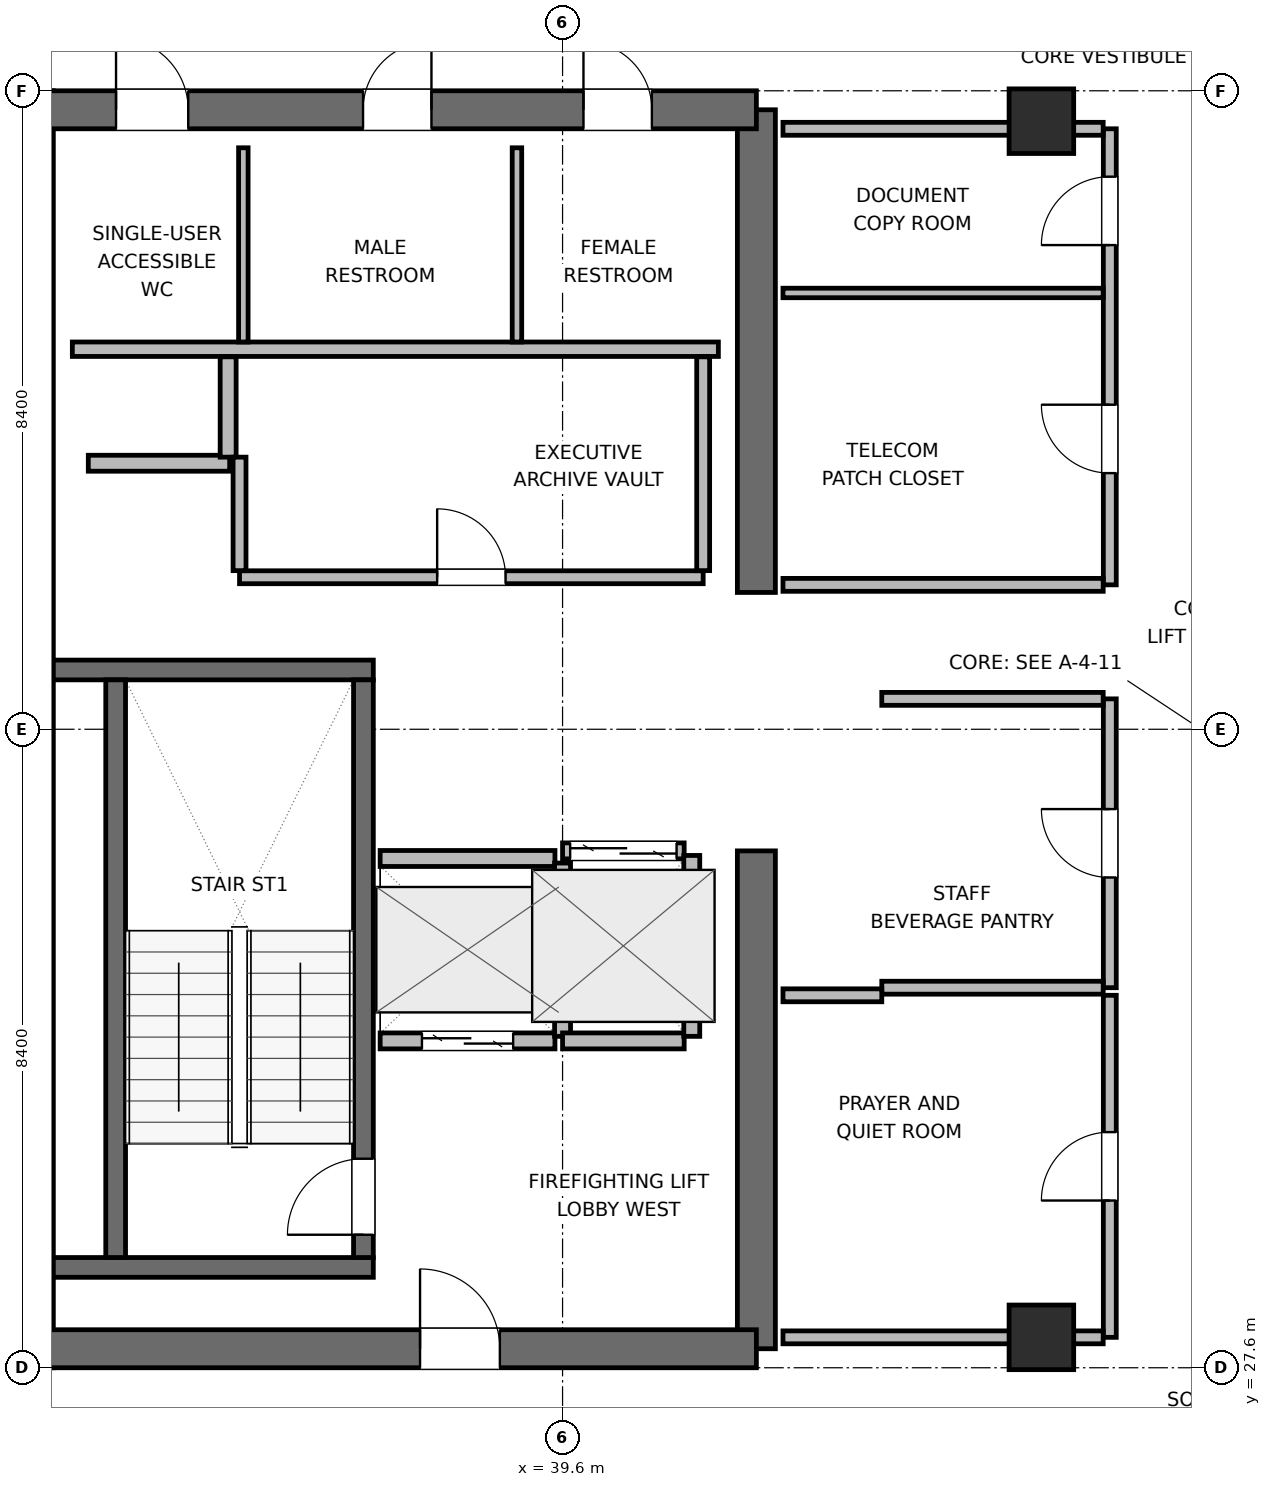
"""IFC4 building model, lengths in metres.
Left out: names, types, materials, properties, quantities, classifications, styles, units other than length and angle.
Written with IfcOpenShell. Run it as: python <this file> out.ifc"""

import sys

from ifc_helpers import new_model, si_unit, direction, frame, frame_2d, origin, origin_2d, place, context, subcontext, project, spatial, rectangle, extrude, element, fill, save


model = new_model("IFC4")
c1 = context("Model", 3, precision=1e-05, world=origin(), true_north=direction((0.0, 1.0)))
c2 = subcontext(c1, "Body", "Model", "MODEL_VIEW")
j1 = project(units=[si_unit("LENGTHUNIT", "METRE"), si_unit("PLANEANGLEUNIT", "RADIAN")], contexts=[c1])
p1 = place(None, origin())
s1 = spatial("IfcSite", under=j1, at=p1, CompositionType="ELEMENT")
p2 = place(p1, origin())
s2 = spatial("IfcBuilding", under=s1, at=p2, CompositionType="ELEMENT")
p3 = place(p2, frame((0.0, 0.0, 262.8)))
s3 = spatial("IfcBuildingStorey", under=s2, at=p3, CompositionType="ELEMENT", Elevation=262.8)
p4 = place(p3, frame((32.65, 27.6, 0.0), z_axis=(0.0, 0.0, 1.0), x_axis=(0.0, 1.0, 0.0)))
e1 = element("IfcWall", 1, at=p4, inside=s3, PredefinedType="SHEAR", context=c2, shape_type="SweptSolid", body=[
    extrude(rectangle(XDim=16.8, YDim=0.5, at=frame_2d((8.4, 0.0))), origin(), (0.0, 0.0, 1.0), 3.9),
])
p5 = place(p3, frame((42.15, 27.85, 0.0), z_axis=(0.0, 0.0, 1.0), x_axis=(0.0, 1.0, 0.0)))
e2 = element("IfcWall", 2, at=p5, inside=s3, PredefinedType="SHEAR", context=c2, shape_type="SweptSolid", body=[
    extrude(rectangle(XDim=6.55, YDim=0.5, at=frame_2d((3.275, 0.0))), origin(), (0.0, 0.0, 1.0), 3.9),
])
p6 = place(p3, frame((42.15, 37.8, 0.0), z_axis=(0.0, 0.0, 1.0), x_axis=(0.0, 1.0, 0.0)))
e3 = element("IfcWall", 3, at=p6, inside=s3, PredefinedType="SHEAR", context=c2, shape_type="SweptSolid", body=[
    extrude(rectangle(XDim=6.35, YDim=0.5, at=frame_2d((3.175, 0.0))), origin(), (0.0, 0.0, 1.0), 3.9),
])
p7 = place(p3, frame((32.65, 27.85, 0.0), z_axis=(0.0, 0.0, 1.0), x_axis=(1.0, 0.0, 0.0)))
e4 = element("IfcWall", 4, at=p7, inside=s3, PredefinedType="SHEAR", context=c2, shape_type="SweptSolid", body=[
    extrude(rectangle(XDim=9.5, YDim=0.5, at=frame_2d((4.75, 0.0))), origin(), (0.0, 0.0, 1.0), 3.9),
])
p8 = place(p7, frame((5.075, 0.0, 0.0)))
e5 = element("IfcOpeningElement", 5, at=p8, cuts=e4, PredefinedType="OPENING", context=c2, shape_type="SweptSolid", body=[
    extrude(rectangle(XDim=1.05, YDim=2.04, at=frame_2d((0.525, 1.02))), frame((0.0, 0.26, 0.0), z_axis=(0.0, -1.0, 0.0), x_axis=(1.0, 0.0, 0.0)), (0.0, 0.0, 1.0), 0.52),
])
p9 = place(p3, frame((32.65, 44.15, 0.0), z_axis=(0.0, 0.0, 1.0), x_axis=(1.0, 0.0, 0.0)))
e6 = element("IfcWall", 6, at=p9, inside=s3, PredefinedType="SHEAR", context=c2, shape_type="SweptSolid", body=[
    extrude(rectangle(XDim=9.5, YDim=0.5, at=frame_2d((4.75, 0.0))), origin(), (0.0, 0.0, 1.0), 3.9),
])
p10 = place(p9, frame((1.075, 0.0, 0.0)))
e7 = element("IfcOpeningElement", 7, at=p10, cuts=e6, PredefinedType="OPENING", context=c2, shape_type="SweptSolid", body=[
    extrude(rectangle(XDim=0.95, YDim=2.04, at=frame_2d((0.475, 1.02))), frame((0.0, 0.26, 0.0), z_axis=(0.0, -1.0, 0.0), x_axis=(1.0, 0.0, 0.0)), (0.0, 0.0, 1.0), 0.52),
])
p11 = place(p9, frame((4.325, 0.0, 0.0)))
e8 = element("IfcOpeningElement", 8, at=p11, cuts=e6, PredefinedType="OPENING", context=c2, shape_type="SweptSolid", body=[
    extrude(rectangle(XDim=0.9, YDim=2.02, at=frame_2d((0.45, 1.01))), frame((0.0, 0.26, 0.0), z_axis=(0.0, -1.0, 0.0), x_axis=(1.0, 0.0, 0.0)), (0.0, 0.0, 1.0), 0.52),
])
p12 = place(p9, frame((7.225, 0.0, 0.0)))
e9 = element("IfcOpeningElement", 9, at=p12, cuts=e6, PredefinedType="OPENING", context=c2, shape_type="SweptSolid", body=[
    extrude(rectangle(XDim=0.9, YDim=2.02, at=frame_2d((0.45, 1.01))), frame((0.0, 0.26, 0.0), z_axis=(0.0, -1.0, 0.0), x_axis=(1.0, 0.0, 0.0)), (0.0, 0.0, 1.0), 0.52),
])
for number, where, z_axis, x_axis in (
    (10, (32.9, 28.92, 0.0), (0.0, 0.0, 1.0), (1.0, 0.0, 0.0)),
    (11, (32.9, 36.78, 0.0), (0.0, 0.0, 1.0), (1.0, 0.0, 0.0)),
):
    element("IfcWall", number, at=place(p3, frame(where, z_axis=z_axis, x_axis=x_axis)), inside=s3, PredefinedType="SHEAR", context=c2, shape_type="SweptSolid", body=[
        extrude(rectangle(XDim=4.21, YDim=0.26, at=frame_2d((2.105, 0.0))), origin(), (0.0, 0.0, 1.0), 3.9),
    ])
p13 = place(p3, frame((33.72, 29.05, 0.0), z_axis=(0.0, 0.0, 1.0), x_axis=(0.0, 1.0, 0.0)))
e12 = element("IfcWall", 12, at=p13, inside=s3, PredefinedType="SHEAR", context=c2, shape_type="SweptSolid", body=[
    extrude(rectangle(XDim=7.6, YDim=0.26, at=frame_2d((3.8, 0.0))), origin(), (0.0, 0.0, 1.0), 3.9),
])
p14 = place(p3, frame((36.98, 29.05, 0.0), z_axis=(0.0, 0.0, 1.0), x_axis=(0.0, 1.0, 0.0)))
e13 = element("IfcWall", 13, at=p14, inside=s3, PredefinedType="SHEAR", context=c2, shape_type="SweptSolid", body=[
    extrude(rectangle(XDim=7.6, YDim=0.26, at=frame_2d((3.8, 0.0))), origin(), (0.0, 0.0, 1.0), 3.9),
])
p15 = place(p14, frame((0.3, 0.0, 0.0)))
e14 = element("IfcOpeningElement", 14, at=p15, cuts=e13, PredefinedType="OPENING", context=c2, shape_type="SweptSolid", body=[
    extrude(rectangle(XDim=1.0, YDim=2.04, at=frame_2d((0.5, 1.02))), frame((0.0, 0.14, 0.0), z_axis=(0.0, -1.0, 0.0), x_axis=(1.0, 0.0, 0.0)), (0.0, 0.0, 1.0), 0.28),
])
for number, where, z_axis, x_axis in (
    (15, (45.9, 28.0, 0.0), (0.0, 0.0, 1.0), (1.0, 0.0, 0.0)),
    (16, (45.9, 44.0, 0.0), (0.0, 0.0, 1.0), (1.0, 0.0, 0.0)),
):
    element("IfcColumn", number, at=place(p3, frame(where, z_axis=z_axis, x_axis=x_axis)), inside=s3, PredefinedType="COLUMN", context=c2, shape_type="SweptSolid", body=[
        extrude(rectangle(XDim=0.85, YDim=0.85, at=origin_2d()), origin(), (0.0, 0.0, 1.0), 3.9),
    ])
p16 = place(p3, frame((33.15, 41.0, 0.0), z_axis=(0.0, 0.0, 1.0), x_axis=(1.0, 0.0, 0.0)))
e17 = element("IfcWall", 17, at=p16, inside=s3, PredefinedType="PLUMBINGWALL", context=c2, shape_type="SweptSolid", body=[
    extrude(rectangle(XDim=8.5, YDim=0.19, at=frame_2d((4.25, 0.0))), origin(), (0.0, 0.0, 1.0), 3.68),
])
for number, where, z_axis, x_axis in (
    (18, (35.4, 41.095, 0.0), (0.0, 0.0, 1.0), (0.0, 1.0, 0.0)),
    (19, (39.0, 41.095, 0.0), (0.0, 0.0, 1.0), (0.0, 1.0, 0.0)),
):
    element("IfcWall", number, at=place(p3, frame(where, z_axis=z_axis, x_axis=x_axis)), inside=s3, PredefinedType="PARTITIONING", context=c2, shape_type="SweptSolid", body=[
        extrude(rectangle(XDim=2.555, YDim=0.125, at=frame_2d((1.277, 0.0))), origin(), (0.0, 0.0, 1.0), 3.68),
    ])
p17 = place(p3, frame((33.36, 39.5, 0.0), z_axis=(0.0, 0.0, 1.0), x_axis=(1.0, 0.0, 0.0)))
e20 = element("IfcWall", 20, at=p17, inside=s3, PredefinedType="PARTITIONING", context=c2, shape_type="SweptSolid", body=[
    extrude(rectangle(XDim=1.86, YDim=0.21, at=frame_2d((0.93, 0.0))), origin(), (0.0, 0.0, 1.0), 3.68),
])
p18 = place(p3, frame((35.2, 39.58, 0.0), z_axis=(0.0, 0.0, 1.0), x_axis=(0.0, 1.0, 0.0)))
e21 = element("IfcWall", 21, at=p18, inside=s3, PredefinedType="PARTITIONING", context=c2, shape_type="SweptSolid", body=[
    extrude(rectangle(XDim=1.32, YDim=0.21, at=frame_2d((0.66, 0.0))), origin(), (0.0, 0.0, 1.0), 3.68),
])
p19 = place(p3, frame((37.2, 31.9, 0.0), z_axis=(0.0, 0.0, 1.0), x_axis=(1.0, 0.0, 0.0)))
e22 = element("IfcWall", 22, at=p19, inside=s3, PredefinedType="PARTITIONING", context=c2, shape_type="SweptSolid", body=[
    extrude(rectangle(XDim=2.3, YDim=0.21, at=frame_2d((1.15, 0.0))), origin(), (0.0, 0.0, 1.0), 3.68),
])
p20 = place(p19, frame((0.55, 0.0, 0.0)))
e23 = element("IfcOpeningElement", 23, at=p20, cuts=e22, PredefinedType="OPENING", context=c2, shape_type="SweptSolid", body=[
    extrude(rectangle(XDim=1.2, YDim=2.04, at=frame_2d((0.6, 1.02))), frame((0.0, 0.115, 0.0), z_axis=(0.0, -1.0, 0.0), x_axis=(1.0, 0.0, 0.0)), (0.0, 0.0, 1.0), 0.23),
])
p21 = place(p3, frame((37.2, 34.3, 0.0), z_axis=(0.0, 0.0, 1.0), x_axis=(1.0, 0.0, 0.0)))
e24 = element("IfcWall", 24, at=p21, inside=s3, PredefinedType="PARTITIONING", context=c2, shape_type="SweptSolid", body=[
    extrude(rectangle(XDim=2.3, YDim=0.21, at=frame_2d((1.15, 0.0))), origin(), (0.0, 0.0, 1.0), 3.68),
])
p22 = place(p3, frame((39.6, 31.96, 0.0), z_axis=(0.0, 0.0, 1.0), x_axis=(0.0, 1.0, 0.0)))
e25 = element("IfcWall", 25, at=p22, inside=s3, PredefinedType="PARTITIONING", context=c2, shape_type="SweptSolid", body=[
    extrude(rectangle(XDim=2.28, YDim=0.21, at=frame_2d((1.14, 0.0))), origin(), (0.0, 0.0, 1.0), 3.68),
])
p23 = place(p3, frame((39.6, 34.4, 0.0), z_axis=(0.0, 0.0, 1.0), x_axis=(1.0, 0.0, 0.0)))
e26 = element("IfcWall", 26, at=p23, inside=s3, PredefinedType="PARTITIONING", context=c2, shape_type="SweptSolid", body=[
    extrude(rectangle(XDim=1.6, YDim=0.21, at=frame_2d((0.8, 0.0))), origin(), (0.0, 0.0, 1.0), 3.68),
])
p24 = place(p23, frame((0.1, 0.0, 0.0)))
e27 = element("IfcOpeningElement", 27, at=p24, cuts=e26, PredefinedType="OPENING", context=c2, shape_type="SweptSolid", body=[
    extrude(rectangle(XDim=1.4, YDim=2.06, at=frame_2d((0.7, 1.03))), frame((0.0, 0.115, 0.0), z_axis=(0.0, -1.0, 0.0), x_axis=(1.0, 0.0, 0.0)), (0.0, 0.0, 1.0), 0.23),
])
p25 = place(p3, frame((39.6, 31.9, 0.0), z_axis=(0.0, 0.0, 1.0), x_axis=(1.0, 0.0, 0.0)))
e28 = element("IfcWall", 28, at=p25, inside=s3, PredefinedType="PARTITIONING", context=c2, shape_type="SweptSolid", body=[
    extrude(rectangle(XDim=1.6, YDim=0.21, at=frame_2d((0.8, 0.0))), origin(), (0.0, 0.0, 1.0), 3.68),
])
p26 = place(p3, frame((41.3, 31.96, 0.0), z_axis=(0.0, 0.0, 1.0), x_axis=(0.0, 1.0, 0.0)))
e29 = element("IfcWall", 29, at=p26, inside=s3, PredefinedType="PARTITIONING", context=c2, shape_type="SweptSolid", body=[
    extrude(rectangle(XDim=2.38, YDim=0.21, at=frame_2d((1.19, 0.0))), origin(), (0.0, 0.0, 1.0), 3.68),
])
p27 = place(p3, frame((35.35, 38.0, 0.0), z_axis=(0.0, 0.0, 1.0), x_axis=(1.0, 0.0, 0.0)))
e30 = element("IfcWall", 30, at=p27, inside=s3, PredefinedType="PARTITIONING", context=c2, shape_type="SweptSolid", body=[
    extrude(rectangle(XDim=6.1, YDim=0.17, at=frame_2d((3.05, 0.0))), origin(), (0.0, 0.0, 1.0), 3.68),
])
p28 = place(p27, frame((2.6, 0.0, 0.0)))
e31 = element("IfcOpeningElement", 31, at=p28, cuts=e30, PredefinedType="OPENING", context=c2, shape_type="SweptSolid", body=[
    extrude(rectangle(XDim=0.9, YDim=2.02, at=frame_2d((0.45, 1.01))), frame((0.0, 0.095, 0.0), z_axis=(0.0, -1.0, 0.0), x_axis=(1.0, 0.0, 0.0)), (0.0, 0.0, 1.0), 0.19),
])
p29 = place(p3, frame((35.35, 38.087, 0.0), z_axis=(0.0, 0.0, 1.0), x_axis=(0.0, 1.0, 0.0)))
e32 = element("IfcWall", 32, at=p29, inside=s3, PredefinedType="PARTITIONING", context=c2, shape_type="SweptSolid", body=[
    extrude(rectangle(XDim=1.493, YDim=0.17, at=frame_2d((0.747, 0.0))), origin(), (0.0, 0.0, 1.0), 3.68),
])
p30 = place(p3, frame((41.45, 38.087, 0.0), z_axis=(0.0, 0.0, 1.0), x_axis=(0.0, 1.0, 0.0)))
e33 = element("IfcWall", 33, at=p30, inside=s3, PredefinedType="PARTITIONING", context=c2, shape_type="SweptSolid", body=[
    extrude(rectangle(XDim=2.813, YDim=0.17, at=frame_2d((1.406, 0.0))), origin(), (0.0, 0.0, 1.0), 3.68),
])
p31 = place(p3, frame((46.8, 32.6, 0.0), z_axis=(0.0, 0.0, 1.0), x_axis=(0.0, 1.0, 0.0)))
e34 = element("IfcWall", 34, at=p31, inside=s3, PredefinedType="PARTITIONING", context=c2, shape_type="SweptSolid", body=[
    extrude(rectangle(XDim=3.8, YDim=0.17, at=frame_2d((1.9, 0.0))), origin(), (0.0, 0.0, 1.0), 3.68),
])
p32 = place(p31, frame((1.45, 0.0, 0.0)))
e35 = element("IfcOpeningElement", 35, at=p32, cuts=e34, PredefinedType="OPENING", context=c2, shape_type="SweptSolid", body=[
    extrude(rectangle(XDim=0.9, YDim=2.02, at=frame_2d((0.45, 1.01))), frame((0.0, 0.095, 0.0), z_axis=(0.0, -1.0, 0.0), x_axis=(1.0, 0.0, 0.0)), (0.0, 0.0, 1.0), 0.19),
])
for number, where, z_axis, x_axis in (
    (36, (43.8, 32.6, 0.0), (0.0, 0.0, 1.0), (1.0, 0.0, 0.0)),
    (37, (43.8, 36.4, 0.0), (0.0, 0.0, 1.0), (1.0, 0.0, 0.0)),
):
    element("IfcWall", number, at=place(p3, frame(where, z_axis=z_axis, x_axis=x_axis)), inside=s3, PredefinedType="PARTITIONING", context=c2, shape_type="SweptSolid", body=[
        extrude(rectangle(XDim=2.913, YDim=0.17, at=frame_2d((1.457, 0.0))), origin(), (0.0, 0.0, 1.0), 3.68),
    ])
p33 = place(p3, frame((46.8, 28.0, 0.0), z_axis=(0.0, 0.0, 1.0), x_axis=(0.0, 1.0, 0.0)))
e38 = element("IfcWall", 38, at=p33, inside=s3, PredefinedType="PARTITIONING", context=c2, shape_type="SweptSolid", body=[
    extrude(rectangle(XDim=4.5, YDim=0.17, at=frame_2d((2.25, 0.0))), origin(), (0.0, 0.0, 1.0), 3.68),
])
p34 = place(p33, frame((1.8, 0.0, 0.0)))
e39 = element("IfcOpeningElement", 39, at=p34, cuts=e38, PredefinedType="OPENING", context=c2, shape_type="SweptSolid", body=[
    extrude(rectangle(XDim=0.9, YDim=2.02, at=frame_2d((0.45, 1.01))), frame((0.0, 0.095, 0.0), z_axis=(0.0, -1.0, 0.0), x_axis=(1.0, 0.0, 0.0)), (0.0, 0.0, 1.0), 0.19),
])
p35 = place(p3, frame((42.5, 28.0, 0.0), z_axis=(0.0, 0.0, 1.0), x_axis=(1.0, 0.0, 0.0)))
e40 = element("IfcWall", 40, at=p35, inside=s3, PredefinedType="PARTITIONING", context=c2, shape_type="SweptSolid", body=[
    extrude(rectangle(XDim=4.213, YDim=0.17, at=frame_2d((2.106, 0.0))), origin(), (0.0, 0.0, 1.0), 2.765),
])
p36 = place(p3, frame((42.5, 32.5, 0.0), z_axis=(0.0, 0.0, 1.0), x_axis=(1.0, 0.0, 0.0)))
e41 = element("IfcWall", 41, at=p36, inside=s3, PredefinedType="PARTITIONING", context=c2, shape_type="SweptSolid", body=[
    extrude(rectangle(XDim=1.3, YDim=0.17, at=frame_2d((0.65, 0.0))), origin(), (0.0, 0.0, 1.0), 3.68),
])
p37 = place(p3, frame((46.8, 37.9, 0.0), z_axis=(0.0, 0.0, 1.0), x_axis=(0.0, 1.0, 0.0)))
e42 = element("IfcWall", 42, at=p37, inside=s3, PredefinedType="PARTITIONING", context=c2, shape_type="SweptSolid", body=[
    extrude(rectangle(XDim=6.0, YDim=0.17, at=frame_2d((3.0, 0.0))), origin(), (0.0, 0.0, 1.0), 3.68),
])
p38 = place(p37, frame((1.47, 0.0, 0.0)))
e43 = element("IfcOpeningElement", 43, at=p38, cuts=e42, PredefinedType="OPENING", context=c2, shape_type="SweptSolid", body=[
    extrude(rectangle(XDim=0.9, YDim=2.02, at=frame_2d((0.45, 1.01))), frame((0.0, 0.095, 0.0), z_axis=(0.0, -1.0, 0.0), x_axis=(1.0, 0.0, 0.0)), (0.0, 0.0, 1.0), 0.19),
])
p39 = place(p37, frame((4.47, 0.0, 0.0)))
e44 = element("IfcOpeningElement", 44, at=p39, cuts=e42, PredefinedType="OPENING", context=c2, shape_type="SweptSolid", body=[
    extrude(rectangle(XDim=0.9, YDim=2.02, at=frame_2d((0.45, 1.01))), frame((0.0, 0.095, 0.0), z_axis=(0.0, -1.0, 0.0), x_axis=(1.0, 0.0, 0.0)), (0.0, 0.0, 1.0), 0.19),
])
p40 = place(p3, frame((42.5, 37.9, 0.0), z_axis=(0.0, 0.0, 1.0), x_axis=(1.0, 0.0, 0.0)))
e45 = element("IfcWall", 45, at=p40, inside=s3, PredefinedType="PARTITIONING", context=c2, shape_type="SweptSolid", body=[
    extrude(rectangle(XDim=4.213, YDim=0.17, at=frame_2d((2.106, 0.0))), origin(), (0.0, 0.0, 1.0), 3.68),
])
p41 = place(p3, frame((42.5, 43.9, 0.0), z_axis=(0.0, 0.0, 1.0), x_axis=(1.0, 0.0, 0.0)))
e46 = element("IfcWall", 46, at=p41, inside=s3, PredefinedType="PARTITIONING", context=c2, shape_type="SweptSolid", body=[
    extrude(rectangle(XDim=4.213, YDim=0.17, at=frame_2d((2.106, 0.0))), origin(), (0.0, 0.0, 1.0), 2.765),
])
p42 = place(p3, frame((42.5, 41.74, 0.0), z_axis=(0.0, 0.0, 1.0), x_axis=(1.0, 0.0, 0.0)))
e47 = element("IfcWall", 47, at=p42, inside=s3, PredefinedType="PARTITIONING", context=c2, shape_type="SweptSolid", body=[
    extrude(rectangle(XDim=4.213, YDim=0.125, at=frame_2d((2.106, 0.0))), origin(), (0.0, 0.0, 1.0), 3.68),
])
p43 = place(p15, origin())
e48 = element("IfcDoor", 48, at=p43, inside=s3, OperationType="SINGLE_SWING_LEFT", PredefinedType="DOOR", context=c2, shape_type="SweptSolid", body=[
    extrude(rectangle(XDim=1.0, YDim=2.04, at=frame_2d((0.5, 1.02))), frame((0.0, 0.025, 0.0), z_axis=(0.0, -1.0, 0.0), x_axis=(1.0, 0.0, 0.0)), (0.0, 0.0, 1.0), 0.05),
])
fill(e14, e48)
p44 = place(p20, origin())
e49 = element("IfcDoor", 49, at=p44, inside=s3, OperationType="DOUBLE_DOOR_SLIDING", PredefinedType="DOOR", context=c2, shape_type="SweptSolid", body=[
    extrude(rectangle(XDim=1.2, YDim=2.04, at=frame_2d((0.6, 1.02))), frame((0.0, 0.025, 0.0), z_axis=(0.0, -1.0, 0.0), x_axis=(1.0, 0.0, 0.0)), (0.0, 0.0, 1.0), 0.05),
])
fill(e23, e49)
p45 = place(p24, origin())
e50 = element("IfcDoor", 50, at=p45, inside=s3, OperationType="DOUBLE_DOOR_SLIDING", PredefinedType="DOOR", context=c2, shape_type="SweptSolid", body=[
    extrude(rectangle(XDim=1.4, YDim=2.06, at=frame_2d((0.7, 1.03))), frame((0.0, 0.025, 0.0), z_axis=(0.0, -1.0, 0.0), x_axis=(1.0, 0.0, 0.0)), (0.0, 0.0, 1.0), 0.05),
])
fill(e27, e50)
p46 = place(p8, origin())
e51 = element("IfcDoor", 51, at=p46, inside=s3, OperationType="SINGLE_SWING_LEFT", PredefinedType="DOOR", context=c2, shape_type="SweptSolid", body=[
    extrude(rectangle(XDim=1.05, YDim=2.04, at=frame_2d((0.525, 1.02))), frame((0.0, 0.025, 0.0), z_axis=(0.0, -1.0, 0.0), x_axis=(1.0, 0.0, 0.0)), (0.0, 0.0, 1.0), 0.05),
])
fill(e5, e51)
p47 = place(p10, origin())
e52 = element("IfcDoor", 52, at=p47, inside=s3, OperationType="SINGLE_SWING_LEFT", PredefinedType="DOOR", context=c2, shape_type="SweptSolid", body=[
    extrude(rectangle(XDim=0.95, YDim=2.04, at=frame_2d((0.475, 1.02))), frame((0.0, 0.025, 0.0), z_axis=(0.0, -1.0, 0.0), x_axis=(1.0, 0.0, 0.0)), (0.0, 0.0, 1.0), 0.05),
])
fill(e7, e52)
p48 = place(p11, origin())
e53 = element("IfcDoor", 53, at=p48, inside=s3, OperationType="SINGLE_SWING_RIGHT", PredefinedType="DOOR", context=c2, shape_type="SweptSolid", body=[
    extrude(rectangle(XDim=0.9, YDim=2.02, at=frame_2d((0.45, 1.01))), frame((0.0, 0.025, 0.0), z_axis=(0.0, -1.0, 0.0), x_axis=(1.0, 0.0, 0.0)), (0.0, 0.0, 1.0), 0.05),
])
fill(e8, e53)
p49 = place(p12, origin())
e54 = element("IfcDoor", 54, at=p49, inside=s3, OperationType="SINGLE_SWING_LEFT", PredefinedType="DOOR", context=c2, shape_type="SweptSolid", body=[
    extrude(rectangle(XDim=0.9, YDim=2.02, at=frame_2d((0.45, 1.01))), frame((0.0, 0.025, 0.0), z_axis=(0.0, -1.0, 0.0), x_axis=(1.0, 0.0, 0.0)), (0.0, 0.0, 1.0), 0.05),
])
fill(e9, e54)
p50 = place(p28, origin())
e55 = element("IfcDoor", 55, at=p50, inside=s3, OperationType="SINGLE_SWING_LEFT", PredefinedType="DOOR", context=c2, shape_type="SweptSolid", body=[
    extrude(rectangle(XDim=0.9, YDim=2.02, at=frame_2d((0.45, 1.01))), frame((0.0, 0.025, 0.0), z_axis=(0.0, -1.0, 0.0), x_axis=(1.0, 0.0, 0.0)), (0.0, 0.0, 1.0), 0.05),
])
fill(e31, e55)
p51 = place(p32, origin())
e56 = element("IfcDoor", 56, at=p51, inside=s3, OperationType="SINGLE_SWING_RIGHT", PredefinedType="DOOR", context=c2, shape_type="SweptSolid", body=[
    extrude(rectangle(XDim=0.9, YDim=2.02, at=frame_2d((0.45, 1.01))), frame((0.0, 0.025, 0.0), z_axis=(0.0, -1.0, 0.0), x_axis=(1.0, 0.0, 0.0)), (0.0, 0.0, 1.0), 0.05),
])
fill(e35, e56)
p52 = place(p34, origin())
e57 = element("IfcDoor", 57, at=p52, inside=s3, OperationType="SINGLE_SWING_LEFT", PredefinedType="DOOR", context=c2, shape_type="SweptSolid", body=[
    extrude(rectangle(XDim=0.9, YDim=2.02, at=frame_2d((0.45, 1.01))), frame((0.0, 0.025, 0.0), z_axis=(0.0, -1.0, 0.0), x_axis=(1.0, 0.0, 0.0)), (0.0, 0.0, 1.0), 0.05),
])
fill(e39, e57)
p53 = place(p38, origin())
e58 = element("IfcDoor", 58, at=p53, inside=s3, OperationType="SINGLE_SWING_RIGHT", PredefinedType="DOOR", context=c2, shape_type="SweptSolid", body=[
    extrude(rectangle(XDim=0.9, YDim=2.02, at=frame_2d((0.45, 1.01))), frame((0.0, 0.025, 0.0), z_axis=(0.0, -1.0, 0.0), x_axis=(1.0, 0.0, 0.0)), (0.0, 0.0, 1.0), 0.05),
])
fill(e43, e58)
p54 = place(p39, origin())
e59 = element("IfcDoor", 59, at=p54, inside=s3, OperationType="SINGLE_SWING_LEFT", PredefinedType="DOOR", context=c2, shape_type="SweptSolid", body=[
    extrude(rectangle(XDim=0.9, YDim=2.02, at=frame_2d((0.45, 1.01))), frame((0.0, 0.025, 0.0), z_axis=(0.0, -1.0, 0.0), x_axis=(1.0, 0.0, 0.0)), (0.0, 0.0, 1.0), 0.05),
])
fill(e44, e59)
save(model, sys.argv[1])
